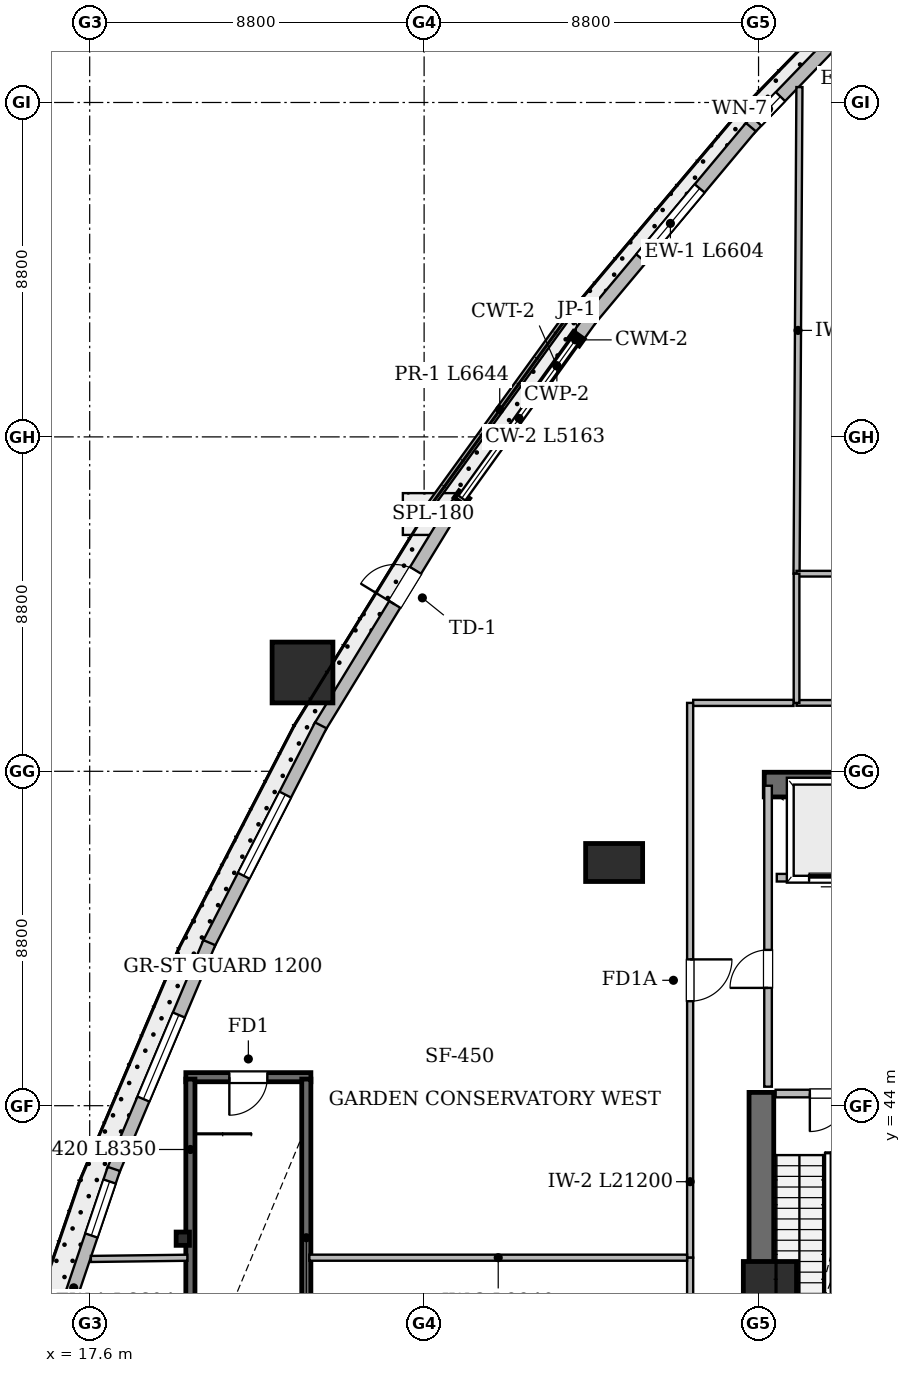
"""IFC4 building model, lengths in metres.
Left out: names, types, materials, properties, quantities, classifications, styles, units other than length and angle.
Written with IfcOpenShell. Run it as: python <this file> out.ifc"""

import sys

from ifc_helpers import new_model, si_unit, direction, frame, frame_2d, origin, origin_2d, place, context, subcontext, project, spatial, rectangle, i_section, extrude, element, fill, save


model = new_model("IFC4")
c1 = context("Model", 3, precision=1e-05, world=origin(), true_north=direction((0.0, 1.0)))
c2 = subcontext(c1, "Body", "Model", "MODEL_VIEW")
j1 = project(units=[si_unit("LENGTHUNIT", "METRE"), si_unit("PLANEANGLEUNIT", "RADIAN")], contexts=[c1])
p1 = place(None, origin())
s1 = spatial("IfcSite", under=j1, at=p1, CompositionType="ELEMENT")
p2 = place(p1, origin())
s2 = spatial("IfcBuilding", under=s1, at=p2, CompositionType="ELEMENT")
p3 = place(p2, frame((0.0, 0.0, 24.0)))
s3 = spatial("IfcBuildingStorey", under=s2, at=p3, CompositionType="ELEMENT", Elevation=24.0)
p4 = place(p3, frame((35.35, 52.45, 0.0), z_axis=(0.0, 0.0, 1.0), x_axis=(1.0, 0.0, 0.0)))
e1 = element("IfcWall", 1, at=p4, inside=s3, PredefinedType="SHEAR", context=c2, shape_type="SweptSolid", body=[
    extrude(rectangle(XDim=17.3, YDim=0.65, at=frame_2d((8.65, 0.0))), origin(), (0.0, 0.0, 1.0), 4.925),
])
p5 = place(p3, frame((35.275, 34.95, 0.0), z_axis=(0.0, 0.0, 1.0), x_axis=(0.0, 1.0, 0.0)))
e2 = element("IfcWall", 2, at=p5, inside=s3, PredefinedType="SHEAR", context=c2, shape_type="SweptSolid", body=[
    extrude(rectangle(XDim=9.4, YDim=0.65, at=frame_2d((4.7, 0.0))), origin(), (0.0, 0.0, 1.0), 4.925),
])
p6 = place(p3, frame((35.5, 39.2, 0.0), z_axis=(0.0, 0.0, 1.0), x_axis=(1.0, 0.0, 0.0)))
e3 = element("IfcColumn", 3, at=p6, inside=s3, PredefinedType="COLUMN", context=c2, shape_type="SweptSolid", body=[
    extrude(rectangle(XDim=1.4, YDim=1.4, at=origin_2d()), origin(), (0.0, 0.0, 1.0), 5.2),
])
p7 = place(p3, frame((31.4, 50.4, 0.0), z_axis=(0.0, 0.0, 1.0), x_axis=(1.0, 0.0, 0.0)))
e4 = element("IfcColumn", 4, at=p7, inside=s3, PredefinedType="COLUMN", context=c2, shape_type="SweptSolid", body=[
    extrude(rectangle(XDim=1.5, YDim=1.0, at=origin_2d()), origin(), (0.0, 0.0, 1.0), 5.2),
])
p8 = place(p3, frame((23.2, 55.4, 0.0), z_axis=(0.0, 0.0, 1.0), x_axis=(1.0, 0.0, 0.0)))
e5 = element("IfcColumn", 5, at=p8, inside=s3, PredefinedType="COLUMN", context=c2, shape_type="SweptSolid", body=[
    extrude(rectangle(XDim=1.6, YDim=1.6, at=origin_2d()), origin(), (0.0, 0.0, 1.0), 5.2),
])
p9 = place(p3, frame((20.05, 40.5, 0.0), z_axis=(0.0, 0.0, 1.0), x_axis=(1.0, 0.0, 0.0)))
e6 = element("IfcColumn", 6, at=p9, inside=s3, PredefinedType="PILASTER", context=c2, shape_type="SweptSolid", body=[
    extrude(i_section(OverallWidth=0.35, OverallDepth=0.35, WebThickness=0.012, FlangeThickness=0.019, FilletRadius=0.02, at=origin_2d()), origin(), (0.0, 0.0, 1.0), 5.2),
])
p10 = place(p3, frame((39.611, 74.528, 0.0), z_axis=(0.0, 0.0, 1.0), x_axis=(-0.694423715799, -0.719566329769, 0.0)))
e7 = element("IfcWall", 7, at=p10, inside=s3, PredefinedType="SOLIDWALL", context=c2, shape_type="SweptSolid", body=[
    extrude(rectangle(XDim=6.71, YDim=0.34, at=frame_2d((3.355, 0.0))), origin(), (0.0, 0.0, 1.0), 4.925),
])
p11 = place(p10, frame((1.177, 0.0, 0.75)))
e8 = element("IfcOpeningElement", 8, at=p11, cuts=e7, PredefinedType="OPENING", context=c2, shape_type="SweptSolid", body=[
    extrude(rectangle(XDim=2.4, YDim=2.2, at=frame_2d((1.2, 1.1))), frame((0.0, 0.18, 0.0), z_axis=(0.0, -1.0, 0.0), x_axis=(1.0, 0.0, 0.0)), (0.0, 0.0, 1.0), 0.36),
])
p12 = place(p10, frame((5.522, 0.0, 0.78)))
e9 = element("IfcOpeningElement", 9, at=p12, cuts=e7, PredefinedType="OPENING", context=c2, shape_type="SweptSolid", body=[
    extrude(rectangle(XDim=0.9, YDim=1.5, at=frame_2d((0.45, 0.75))), frame((0.0, 0.18, 0.0), z_axis=(0.0, -1.0, 0.0), x_axis=(1.0, 0.0, 0.0)), (0.0, 0.0, 1.0), 0.36),
])
p13 = place(p3, frame((34.998, 69.752, 0.0), z_axis=(0.0, 0.0, 1.0), x_axis=(-0.641321828383, -0.76727199378, 0.0)))
e10 = element("IfcWall", 10, at=p13, inside=s3, PredefinedType="SOLIDWALL", context=c2, shape_type="SweptSolid", body=[
    extrude(rectangle(XDim=6.604, YDim=0.34, at=frame_2d((3.302, 0.0))), origin(), (0.0, 0.0, 1.0), 4.925),
])
p14 = place(p13, frame((2.102, 0.0, 0.75)))
e11 = element("IfcOpeningElement", 11, at=p14, cuts=e10, PredefinedType="OPENING", context=c2, shape_type="SweptSolid", body=[
    extrude(rectangle(XDim=2.4, YDim=2.2, at=frame_2d((1.2, 1.1))), frame((0.0, 0.18, 0.0), z_axis=(0.0, -1.0, 0.0), x_axis=(1.0, 0.0, 0.0)), (0.0, 0.0, 1.0), 0.36),
])
p15 = place(p3, frame((30.806, 64.74, 0.0), z_axis=(0.0, 0.0, 1.0), x_axis=(-0.583529006477, -0.812092296848, 0.0)))
e12 = element("IfcWall", 12, at=p15, inside=s3, PredefinedType="SOLIDWALL", context=c2, shape_type="SweptSolid", body=[
    extrude(rectangle(XDim=0.705, YDim=0.34, at=frame_2d((0.353, 0.0))), origin(), (0.0, 0.0, 1.0), 4.925),
])
p16 = place(p3, frame((27.406, 60.006, 0.0), z_axis=(0.0, 0.0, 1.0), x_axis=(-0.58346469378, -0.812138504882, 0.0)))
e13 = element("IfcWall", 13, at=p16, inside=s3, PredefinedType="SOLIDWALL", context=c2, shape_type="SweptSolid", body=[
    extrude(rectangle(XDim=0.705, YDim=0.34, at=frame_2d((0.352, 0.0))), origin(), (0.0, 0.0, 1.0), 4.925),
])
p17 = place(p3, frame((27.033, 59.492, 0.0), z_axis=(0.0, 0.0, 1.0), x_axis=(-0.52129343632, -0.853377497506, 0.0)))
e14 = element("IfcWall", 14, at=p17, inside=s3, PredefinedType="SOLIDWALL", context=c2, shape_type="SweptSolid", body=[
    extrude(rectangle(XDim=6.497, YDim=0.34, at=frame_2d((3.249, 0.0))), origin(), (0.0, 0.0, 1.0), 2.913),
])
p18 = place(p17, frame((1.646, 0.0, 0.0)))
e15 = element("IfcOpeningElement", 15, at=p18, cuts=e14, PredefinedType="OPENING", context=c2, shape_type="SweptSolid", body=[
    extrude(rectangle(XDim=1.05, YDim=2.15, at=frame_2d((0.525, 1.075))), frame((0.0, 0.18, 0.0), z_axis=(0.0, -1.0, 0.0), x_axis=(1.0, 0.0, 0.0)), (0.0, 0.0, 1.0), 0.36),
])
p19 = place(p3, frame((23.681, 54.009, 0.0), z_axis=(0.0, 0.0, 1.0), x_axis=(-0.455940488826, -0.89001026435, 0.0)))
e16 = element("IfcWall", 16, at=p19, inside=s3, PredefinedType="SOLIDWALL", context=c2, shape_type="SweptSolid", body=[
    extrude(rectangle(XDim=6.497, YDim=0.34, at=frame_2d((3.249, 0.0))), origin(), (0.0, 0.0, 1.0), 4.925),
])
p20 = place(p19, frame((2.048, 0.0, 0.75)))
e17 = element("IfcOpeningElement", 17, at=p20, cuts=e16, PredefinedType="OPENING", context=c2, shape_type="SweptSolid", body=[
    extrude(rectangle(XDim=2.4, YDim=2.2, at=frame_2d((1.2, 1.1))), frame((0.0, 0.18, 0.0), z_axis=(0.0, -1.0, 0.0), x_axis=(1.0, 0.0, 0.0)), (0.0, 0.0, 1.0), 0.36),
])
p21 = place(p3, frame((20.748, 48.291, 0.0), z_axis=(0.0, 0.0, 1.0), x_axis=(-0.388364391847, -0.921505886658, 0.0)))
e18 = element("IfcWall", 18, at=p21, inside=s3, PredefinedType="SOLIDWALL", context=c2, shape_type="SweptSolid", body=[
    extrude(rectangle(XDim=6.533, YDim=0.34, at=frame_2d((3.266, 0.0))), origin(), (0.0, 0.0, 1.0), 4.925),
])
p22 = place(p21, frame((2.066, 0.0, 0.75)))
e19 = element("IfcOpeningElement", 19, at=p22, cuts=e18, PredefinedType="OPENING", context=c2, shape_type="SweptSolid", body=[
    extrude(rectangle(XDim=2.4, YDim=2.2, at=frame_2d((1.2, 1.1))), frame((0.0, 0.18, 0.0), z_axis=(0.0, -1.0, 0.0), x_axis=(1.0, 0.0, 0.0)), (0.0, 0.0, 1.0), 0.36),
])
p23 = place(p3, frame((18.236, 42.336, 0.0), z_axis=(0.0, 0.0, 1.0), x_axis=(-0.31980768303, -0.947482477872, 0.0)))
e20 = element("IfcWall", 20, at=p23, inside=s3, PredefinedType="SOLIDWALL", context=c2, shape_type="SweptSolid", body=[
    extrude(rectangle(XDim=6.604, YDim=0.34, at=frame_2d((3.302, 0.0))), origin(), (0.0, 0.0, 1.0), 4.925),
])
p24 = place(p23, frame((0.349, 0.0, 0.8)))
e21 = element("IfcOpeningElement", 21, at=p24, cuts=e20, PredefinedType="OPENING", context=c2, shape_type="SweptSolid", body=[
    extrude(rectangle(XDim=1.5, YDim=1.6, at=frame_2d((0.75, 0.8))), frame((0.0, 0.18, 0.0), z_axis=(0.0, -1.0, 0.0), x_axis=(1.0, 0.0, 0.0)), (0.0, 0.0, 1.0), 0.36),
])
p25 = place(p23, frame((3.441, 0.0, 0.75)))
e22 = element("IfcOpeningElement", 22, at=p25, cuts=e20, PredefinedType="OPENING", context=c2, shape_type="SweptSolid", body=[
    extrude(rectangle(XDim=2.4, YDim=2.2, at=frame_2d((1.2, 1.1))), frame((0.0, 0.18, 0.0), z_axis=(0.0, -1.0, 0.0), x_axis=(1.0, 0.0, 0.0)), (0.0, 0.0, 1.0), 0.36),
])
p26 = place(p3, frame((30.339, 65.008, 0.0), z_axis=(0.0, 0.0, 1.0), x_axis=(-0.58679654881, -0.809734407263, 0.0)))
e23 = element("IfcWall", 23, at=p26, inside=s3, PredefinedType="PARAPET", context=c2, shape_type="SweptSolid", body=[
    extrude(rectangle(XDim=6.644, YDim=0.18, at=frame_2d((3.322, 0.0))), origin(), (0.0, 0.0, 1.0), 0.45),
])
p27 = place(p3, frame((20.13, 44.75, 0.0), z_axis=(0.0, 0.0, 1.0), x_axis=(1.0, 0.0, 0.0)))
e24 = element("IfcWall", 24, at=p27, inside=s3, PredefinedType="SHEAR", context=c2, shape_type="SweptSolid", body=[
    extrude(rectangle(XDim=3.29, YDim=0.24, at=frame_2d((1.645, 0.0))), origin(), (0.0, 0.0, 1.0), 4.925),
])
p28 = place(p27, frame((1.145, 0.0, 0.0)))
e25 = element("IfcOpeningElement", 25, at=p28, cuts=e24, PredefinedType="OPENING", context=c2, shape_type="SweptSolid", body=[
    extrude(rectangle(XDim=1.0, YDim=2.15, at=frame_2d((0.5, 1.075))), frame((0.0, 0.13, 0.0), z_axis=(0.0, -1.0, 0.0), x_axis=(1.0, 0.0, 0.0)), (0.0, 0.0, 1.0), 0.26),
])
for number, where, z_axis, x_axis in (
    (26, (20.25, 36.35, 0.0), (0.0, 0.0, 1.0), (0.0, 1.0, 0.0)),
    (27, (23.3, 36.35, 0.0), (0.0, 0.0, 1.0), (0.0, 1.0, 0.0)),
):
    element("IfcWall", number, at=place(p3, frame(where, z_axis=z_axis, x_axis=x_axis)), inside=s3, PredefinedType="SHEAR", context=c2, shape_type="SweptSolid", body=[
        extrude(rectangle(XDim=8.35, YDim=0.24, at=frame_2d((4.175, 0.0))), origin(), (0.0, 0.0, 1.0), 4.925),
    ])
p29 = place(p3, frame((33.4, 54.6, 0.0), z_axis=(0.0, 0.0, 1.0), x_axis=(0.0, -1.0, 0.0)))
e28 = element("IfcWall", 28, at=p29, inside=s3, PredefinedType="SOLIDWALL", context=c2, shape_type="SweptSolid", body=[
    extrude(rectangle(XDim=14.6, YDim=0.16, at=frame_2d((7.3, 0.0))), origin(), (0.0, 0.0, 1.0), 4.263),
])
p30 = place(p29, frame((6.75, 0.0, 0.0)))
e29 = element("IfcOpeningElement", 29, at=p30, cuts=e28, PredefinedType="OPENING", context=c2, shape_type="SweptSolid", body=[
    extrude(rectangle(XDim=1.1, YDim=2.15, at=frame_2d((0.55, 1.075))), frame((0.0, 0.09, 0.0), z_axis=(0.0, -1.0, 0.0), x_axis=(1.0, 0.0, 0.0)), (0.0, 0.0, 1.0), 0.18),
])
p31 = place(p3, frame((35.45, 44.5, 0.0), z_axis=(0.0, 0.0, 1.0), x_axis=(0.0, 1.0, 0.0)))
e30 = element("IfcWall", 30, at=p31, inside=s3, PredefinedType="SOLIDWALL", context=c2, shape_type="SweptSolid", body=[
    extrude(rectangle(XDim=7.92, YDim=0.2, at=frame_2d((3.96, 0.0))), origin(), (0.0, 0.0, 1.0), 4.925),
])
p32 = place(p31, frame((2.6, 0.0, 0.0)))
e31 = element("IfcOpeningElement", 31, at=p32, cuts=e30, PredefinedType="OPENING", context=c2, shape_type="SweptSolid", body=[
    extrude(rectangle(XDim=1.0, YDim=2.15, at=frame_2d((0.5, 1.075))), frame((0.0, 0.11, 0.0), z_axis=(0.0, -1.0, 0.0), x_axis=(1.0, 0.0, 0.0)), (0.0, 0.0, 1.0), 0.22),
])
p33 = place(p3, frame((33.4, 40.0, 0.0), z_axis=(0.0, 0.0, 1.0), x_axis=(0.0, -1.0, 0.0)))
e32 = element("IfcWall", 32, at=p33, inside=s3, PredefinedType="SOLIDWALL", context=c2, shape_type="SweptSolid", body=[
    extrude(rectangle(XDim=6.6, YDim=0.16, at=frame_2d((3.3, 0.0))), origin(), (0.0, 0.0, 1.0), 4.263),
])
p34 = place(p33, frame((2.75, 0.0, 0.0)))
e33 = element("IfcOpeningElement", 33, at=p34, cuts=e32, PredefinedType="OPENING", context=c2, shape_type="SweptSolid", body=[
    extrude(rectangle(XDim=1.1, YDim=2.15, at=frame_2d((0.55, 1.075))), frame((0.0, 0.09, 0.0), z_axis=(0.0, -1.0, 0.0), x_axis=(1.0, 0.0, 0.0)), (0.0, 0.0, 1.0), 0.18),
])
p35 = place(p3, frame((40.0, 54.6, 0.0), z_axis=(0.0, 0.0, 1.0), x_axis=(-1.0, 0.0, 0.0)))
e34 = element("IfcWall", 34, at=p35, inside=s3, PredefinedType="PLUMBINGWALL", context=c2, shape_type="SweptSolid", body=[
    extrude(rectangle(XDim=3.8, YDim=0.15, at=frame_2d((1.9, 0.0))), origin(), (0.0, 0.0, 1.0), 4.263),
])
p36 = place(p35, frame((1.45, 0.0, 0.0)))
e35 = element("IfcOpeningElement", 35, at=p36, cuts=e34, PredefinedType="OPENING", context=c2, shape_type="SweptSolid", body=[
    extrude(rectangle(XDim=0.9, YDim=2.1, at=frame_2d((0.45, 1.05))), frame((0.0, 0.085, 0.0), z_axis=(0.0, -1.0, 0.0), x_axis=(1.0, 0.0, 0.0)), (0.0, 0.0, 1.0), 0.17),
])
p37 = place(p3, frame((35.65, 44.32, 0.0), z_axis=(0.0, 0.0, 1.0), x_axis=(1.0, 0.0, 0.0)))
e36 = element("IfcWall", 36, at=p37, inside=s3, PredefinedType="SOLIDWALL", context=c2, shape_type="SweptSolid", body=[
    extrude(rectangle(XDim=2.8, YDim=0.2, at=frame_2d((1.4, 0.0))), origin(), (0.0, 0.0, 1.0), 4.925),
])
p38 = place(p37, frame((0.9, 0.0, 0.0)))
e37 = element("IfcOpeningElement", 37, at=p38, cuts=e36, PredefinedType="OPENING", context=c2, shape_type="SweptSolid", body=[
    extrude(rectangle(XDim=1.0, YDim=2.15, at=frame_2d((0.5, 1.075))), frame((0.0, 0.11, 0.0), z_axis=(0.0, -1.0, 0.0), x_axis=(1.0, 0.0, 0.0)), (0.0, 0.0, 1.0), 0.22),
])
p39 = place(p3, frame((35.68, 50.0, 0.0), z_axis=(0.0, 0.0, 1.0), x_axis=(1.0, 0.0, 0.0)))
e38 = element("IfcWall", 38, at=p39, inside=s3, PredefinedType="SOLIDWALL", context=c2, shape_type="SweptSolid", body=[
    extrude(rectangle(XDim=2.8, YDim=0.2, at=frame_2d((1.4, 0.0))), origin(), (0.0, 0.0, 1.0), 4.925),
])
p40 = place(p39, frame((0.85, 0.0, 0.0)))
e39 = element("IfcOpeningElement", 39, at=p40, cuts=e38, PredefinedType="OPENING", context=c2, shape_type="SweptSolid", body=[
    extrude(rectangle(XDim=1.1, YDim=2.15, at=frame_2d((0.55, 1.075))), frame((0.0, 0.11, 0.0), z_axis=(0.0, -1.0, 0.0), x_axis=(1.0, 0.0, 0.0)), (0.0, 0.0, 1.0), 0.22),
])
p41 = place(p3, frame((36.2, 58.0, 0.0), z_axis=(0.0, 0.0, 1.0), x_axis=(0.005929465439, 0.999982420565, 0.0)))
e40 = element("IfcWall", 40, at=p41, inside=s3, PredefinedType="SOLIDWALL", context=c2, shape_type="SweptSolid", body=[
    extrude(rectangle(XDim=12.805, YDim=0.16, at=frame_2d((6.403, 0.0))), origin(), (0.0, 0.0, 1.0), 2.913),
])
p42 = place(p3, frame((33.32, 40.0, 0.0), z_axis=(0.0, 0.0, 1.0), x_axis=(-1.0, 0.0, 0.0)))
e41 = element("IfcWall", 41, at=p42, inside=s3, PredefinedType="SOLIDWALL", context=c2, shape_type="SweptSolid", body=[
    extrude(rectangle(XDim=9.94, YDim=0.16, at=frame_2d((4.97, 0.0))), origin(), (0.0, 0.0, 1.0), 4.263),
])
p43 = place(p3, frame((40.0, 58.0, 0.0), z_axis=(0.0, 0.0, 1.0), x_axis=(-1.0, 0.0, 0.0)))
e42 = element("IfcWall", 42, at=p43, inside=s3, PredefinedType="PLUMBINGWALL", context=c2, shape_type="SweptSolid", body=[
    extrude(rectangle(XDim=3.8, YDim=0.15, at=frame_2d((1.9, 0.0))), origin(), (0.0, 0.0, 1.0), 4.925),
])
p44 = place(p3, frame((36.2, 58.0, 0.0), z_axis=(0.0, 0.0, 1.0), x_axis=(0.0, -1.0, 0.0)))
e43 = element("IfcWall", 43, at=p44, inside=s3, PredefinedType="PLUMBINGWALL", context=c2, shape_type="SweptSolid", body=[
    extrude(rectangle(XDim=3.4, YDim=0.15, at=frame_2d((1.7, 0.0))), origin(), (0.0, 0.0, 1.0), 4.925),
])
p45 = place(p3, frame((36.12, 54.6, 0.0), z_axis=(0.0, 0.0, 1.0), x_axis=(-1.0, 0.0, 0.0)))
e44 = element("IfcWall", 44, at=p45, inside=s3, PredefinedType="SOLIDWALL", context=c2, shape_type="SweptSolid", body=[
    extrude(rectangle(XDim=2.64, YDim=0.16, at=frame_2d((1.32, 0.0))), origin(), (0.0, 0.0, 1.0), 4.925),
])
p46 = place(p3, frame((20.17, 39.999, 0.0), z_axis=(0.0, 0.0, 1.0), x_axis=(-0.999920662638, -0.01259636569, 0.0)))
e45 = element("IfcWall", 45, at=p46, inside=s3, PredefinedType="SOLIDWALL", context=c2, shape_type="SweptSolid", body=[
    extrude(rectangle(XDim=2.539, YDim=0.16, at=frame_2d((1.27, 0.0))), origin(), (0.0, 0.0, 1.0), 4.925),
])
p47 = place(p12, origin())
e46 = element("IfcWindow", 46, at=p47, inside=s3, PartitioningType="SINGLE_PANEL", PredefinedType="WINDOW", context=c2, shape_type="SweptSolid", body=[
    extrude(rectangle(XDim=0.9, YDim=1.5, at=frame_2d((0.45, 0.75))), frame((0.0, 0.03, 0.0), z_axis=(0.0, -1.0, 0.0), x_axis=(1.0, 0.0, 0.0)), (0.0, 0.0, 1.0), 0.06),
])
fill(e9, e46)
p48 = place(p14, origin())
e47 = element("IfcWindow", 47, at=p48, inside=s3, PartitioningType="SINGLE_PANEL", PredefinedType="WINDOW", context=c2, shape_type="SweptSolid", body=[
    extrude(rectangle(XDim=2.4, YDim=2.2, at=frame_2d((1.2, 1.1))), frame((0.0, 0.03, 0.0), z_axis=(0.0, -1.0, 0.0), x_axis=(1.0, 0.0, 0.0)), (0.0, 0.0, 1.0), 0.06),
])
fill(e11, e47)
p49 = place(p18, frame((1.05, 0.0, 0.0), z_axis=(0.0, 0.0, 1.0), x_axis=(-1.0, 0.0, 0.0)))
e48 = element("IfcDoor", 48, at=p49, inside=s3, OperationType="SINGLE_SWING_RIGHT", PredefinedType="DOOR", context=c2, shape_type="SweptSolid", body=[
    extrude(rectangle(XDim=1.05, YDim=2.15, at=frame_2d((0.525, 1.075))), frame((0.0, 0.025, 0.0), z_axis=(0.0, -1.0, 0.0), x_axis=(1.0, 0.0, 0.0)), (0.0, 0.0, 1.0), 0.05),
])
fill(e15, e48)
p50 = place(p20, origin())
e49 = element("IfcWindow", 49, at=p50, inside=s3, PartitioningType="SINGLE_PANEL", PredefinedType="WINDOW", context=c2, shape_type="SweptSolid", body=[
    extrude(rectangle(XDim=2.4, YDim=2.2, at=frame_2d((1.2, 1.1))), frame((0.0, 0.03, 0.0), z_axis=(0.0, -1.0, 0.0), x_axis=(1.0, 0.0, 0.0)), (0.0, 0.0, 1.0), 0.06),
])
fill(e17, e49)
p51 = place(p22, origin())
e50 = element("IfcWindow", 50, at=p51, inside=s3, PartitioningType="SINGLE_PANEL", PredefinedType="WINDOW", context=c2, shape_type="SweptSolid", body=[
    extrude(rectangle(XDim=2.4, YDim=2.2, at=frame_2d((1.2, 1.1))), frame((0.0, 0.03, 0.0), z_axis=(0.0, -1.0, 0.0), x_axis=(1.0, 0.0, 0.0)), (0.0, 0.0, 1.0), 0.06),
])
fill(e19, e50)
p52 = place(p24, origin())
e51 = element("IfcWindow", 51, at=p52, inside=s3, PartitioningType="SINGLE_PANEL", PredefinedType="WINDOW", context=c2, shape_type="SweptSolid", body=[
    extrude(rectangle(XDim=1.5, YDim=1.6, at=frame_2d((0.75, 0.8))), frame((0.0, 0.03, 0.0), z_axis=(0.0, -1.0, 0.0), x_axis=(1.0, 0.0, 0.0)), (0.0, 0.0, 1.0), 0.06),
])
fill(e21, e51)
p53 = place(p25, origin())
e52 = element("IfcWindow", 52, at=p53, inside=s3, PartitioningType="SINGLE_PANEL", PredefinedType="WINDOW", context=c2, shape_type="SweptSolid", body=[
    extrude(rectangle(XDim=2.4, YDim=2.2, at=frame_2d((1.2, 1.1))), frame((0.0, 0.03, 0.0), z_axis=(0.0, -1.0, 0.0), x_axis=(1.0, 0.0, 0.0)), (0.0, 0.0, 1.0), 0.06),
])
fill(e22, e52)
p54 = place(p28, frame((1.0, 0.0, 0.0), z_axis=(0.0, 0.0, 1.0), x_axis=(-1.0, 0.0, 0.0)))
e53 = element("IfcDoor", 53, at=p54, inside=s3, OperationType="SINGLE_SWING_LEFT", PredefinedType="DOOR", context=c2, shape_type="SweptSolid", body=[
    extrude(rectangle(XDim=1.0, YDim=2.15, at=frame_2d((0.5, 1.075))), frame((0.0, 0.025, 0.0), z_axis=(0.0, -1.0, 0.0), x_axis=(1.0, 0.0, 0.0)), (0.0, 0.0, 1.0), 0.05),
])
fill(e25, e53)
p55 = place(p38, frame((1.0, 0.0, 0.0), z_axis=(0.0, 0.0, 1.0), x_axis=(-1.0, 0.0, 0.0)))
e54 = element("IfcDoor", 54, at=p55, inside=s3, OperationType="SINGLE_SWING_LEFT", PredefinedType="DOOR", context=c2, shape_type="SweptSolid", body=[
    extrude(rectangle(XDim=1.0, YDim=2.15, at=frame_2d((0.5, 1.075))), frame((0.0, 0.025, 0.0), z_axis=(0.0, -1.0, 0.0), x_axis=(1.0, 0.0, 0.0)), (0.0, 0.0, 1.0), 0.05),
])
fill(e37, e54)
p56 = place(p32, origin())
e55 = element("IfcDoor", 55, at=p56, inside=s3, OperationType="SINGLE_SWING_LEFT", PredefinedType="DOOR", context=c2, shape_type="SweptSolid", body=[
    extrude(rectangle(XDim=1.0, YDim=2.15, at=frame_2d((0.5, 1.075))), frame((0.0, 0.025, 0.0), z_axis=(0.0, -1.0, 0.0), x_axis=(1.0, 0.0, 0.0)), (0.0, 0.0, 1.0), 0.05),
])
fill(e31, e55)
p57 = place(p40, origin())
e56 = element("IfcDoor", 56, at=p57, inside=s3, OperationType="SLIDING_TO_LEFT", PredefinedType="DOOR", context=c2, shape_type="SweptSolid", body=[
    extrude(rectangle(XDim=1.1, YDim=2.15, at=frame_2d((0.55, 1.075))), frame((0.0, 0.025, 0.0), z_axis=(0.0, -1.0, 0.0), x_axis=(1.0, 0.0, 0.0)), (0.0, 0.0, 1.0), 0.05),
])
fill(e39, e56)
p58 = place(p30, origin())
e57 = element("IfcDoor", 57, at=p58, inside=s3, OperationType="SINGLE_SWING_LEFT", PredefinedType="DOOR", context=c2, shape_type="SweptSolid", body=[
    extrude(rectangle(XDim=1.1, YDim=2.15, at=frame_2d((0.55, 1.075))), frame((0.0, 0.025, 0.0), z_axis=(0.0, -1.0, 0.0), x_axis=(1.0, 0.0, 0.0)), (0.0, 0.0, 1.0), 0.05),
])
fill(e29, e57)
save(model, sys.argv[1])
